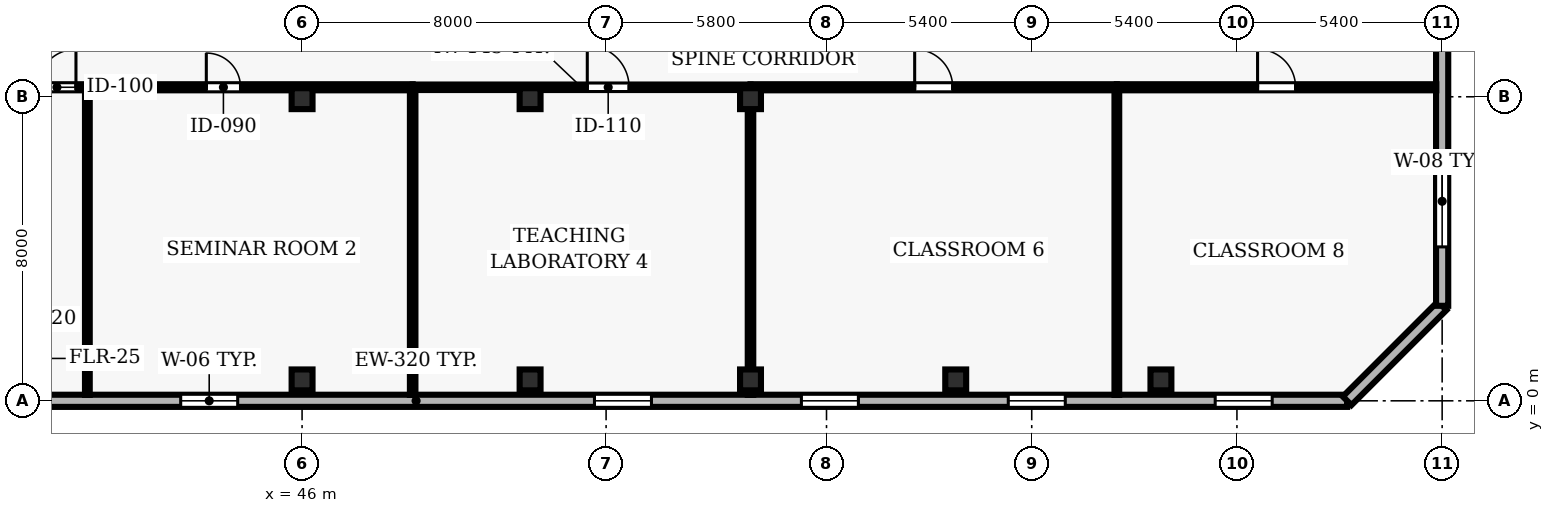
"""IFC4 building model, lengths in metres.
Left out: names, types, materials, properties, quantities, classifications, styles, units other than length and angle.
Written with IfcOpenShell. Run it as: python <this file> out.ifc"""

import sys

from ifc_helpers import new_model, si_unit, direction, frame, frame_2d, origin, origin_2d, place, context, subcontext, project, spatial, rectangle, hollow_rectangle, extrude, element, fill, save


model = new_model("IFC4")
c1 = context("Model", 3, precision=1e-05, world=origin(), true_north=direction((0.0, 1.0)))
c2 = subcontext(c1, "Body", "Model", "MODEL_VIEW")
j1 = project(units=[si_unit("LENGTHUNIT", "METRE"), si_unit("PLANEANGLEUNIT", "RADIAN")], contexts=[c1])
p1 = place(None, origin())
s1 = spatial("IfcSite", under=j1, at=p1, CompositionType="ELEMENT")
p2 = place(p1, origin())
s2 = spatial("IfcBuilding", under=s1, at=p2, CompositionType="ELEMENT")
p3 = place(p2, frame((0.0, 0.0, 26.0)))
s3 = spatial("IfcBuildingStorey", under=s2, at=p3, CompositionType="ELEMENT", Elevation=26.0)
for number, where, z_axis, x_axis in (
    (1, (46.0, 0.55, 0.0), (0.0, 0.0, 1.0), (1.0, 0.0, 0.0)),
    (2, (46.0, 7.95, 0.0), (0.0, 0.0, 1.0), (1.0, 0.0, 0.0)),
    (3, (52.0, 0.55, 0.0), (0.0, 0.0, 1.0), (1.0, 0.0, 0.0)),
    (4, (52.0, 7.95, 0.0), (0.0, 0.0, 1.0), (1.0, 0.0, 0.0)),
    (5, (57.8, 0.55, 0.0), (0.0, 0.0, 1.0), (1.0, 0.0, 0.0)),
    (6, (57.8, 7.95, 0.0), (0.0, 0.0, 1.0), (1.0, 0.0, 0.0)),
    (7, (63.2, 0.55, 0.0), (0.0, 0.0, 1.0), (1.0, 0.0, 0.0)),
    (8, (68.6, 0.55, 0.0), (0.0, 0.0, 1.0), (1.0, 0.0, 0.0)),
):
    element("IfcColumn", number, at=place(p3, frame(where, z_axis=z_axis, x_axis=x_axis)), inside=s3, PredefinedType="COLUMN", context=c2, shape_type="SweptSolid", body=[
        extrude(hollow_rectangle(XDim=0.55, YDim=0.55, WallThickness=0.025, at=origin_2d()), origin(), (0.0, 0.0, 1.0), 5.0),
    ])
p4 = place(p3, frame((24.5, 0.0, 0.0), z_axis=(0.0, 0.0, 1.0), x_axis=(1.0, 0.0, 0.0)))
e9 = element("IfcWall", 9, at=p4, inside=s3, PredefinedType="SOLIDWALL", context=c2, shape_type="SweptSolid", body=[
    extrude(rectangle(XDim=49.0, YDim=0.32, at=frame_2d((24.5, 0.0))), origin(), (0.0, 0.0, 1.0), 4.79),
])
p5 = place(p4, frame((1.972, 0.0, 0.9)))
e10 = element("IfcOpeningElement", 10, at=p5, cuts=e9, PredefinedType="OPENING", context=c2, shape_type="SweptSolid", body=[
    extrude(rectangle(XDim=1.5, YDim=1.8, at=frame_2d((0.75, 0.9))), frame((0.0, 0.17, 0.0), z_axis=(0.0, -1.0, 0.0), x_axis=(1.0, 0.0, 0.0)), (0.0, 0.0, 1.0), 0.34),
])
p6 = place(p4, frame((8.317, 0.0, 0.9)))
e11 = element("IfcOpeningElement", 11, at=p6, cuts=e9, PredefinedType="OPENING", context=c2, shape_type="SweptSolid", body=[
    extrude(rectangle(XDim=1.5, YDim=1.8, at=frame_2d((0.75, 0.9))), frame((0.0, 0.17, 0.0), z_axis=(0.0, -1.0, 0.0), x_axis=(1.0, 0.0, 0.0)), (0.0, 0.0, 1.0), 0.34),
])
p7 = place(p4, frame((18.306, 0.0, 0.9)))
e12 = element("IfcOpeningElement", 12, at=p7, cuts=e9, PredefinedType="OPENING", context=c2, shape_type="SweptSolid", body=[
    extrude(rectangle(XDim=1.5, YDim=1.8, at=frame_2d((0.75, 0.9))), frame((0.0, 0.17, 0.0), z_axis=(0.0, -1.0, 0.0), x_axis=(1.0, 0.0, 0.0)), (0.0, 0.0, 1.0), 0.34),
])
p8 = place(p4, frame((29.194, 0.0, 0.9)))
e13 = element("IfcOpeningElement", 13, at=p8, cuts=e9, PredefinedType="OPENING", context=c2, shape_type="SweptSolid", body=[
    extrude(rectangle(XDim=1.5, YDim=1.8, at=frame_2d((0.75, 0.9))), frame((0.0, 0.17, 0.0), z_axis=(0.0, -1.0, 0.0), x_axis=(1.0, 0.0, 0.0)), (0.0, 0.0, 1.0), 0.34),
])
p9 = place(p4, frame((34.639, 0.0, 0.9)))
e14 = element("IfcOpeningElement", 14, at=p9, cuts=e9, PredefinedType="OPENING", context=c2, shape_type="SweptSolid", body=[
    extrude(rectangle(XDim=1.5, YDim=1.8, at=frame_2d((0.75, 0.9))), frame((0.0, 0.17, 0.0), z_axis=(0.0, -1.0, 0.0), x_axis=(1.0, 0.0, 0.0)), (0.0, 0.0, 1.0), 0.34),
])
p10 = place(p4, frame((40.083, 0.0, 0.9)))
e15 = element("IfcOpeningElement", 15, at=p10, cuts=e9, PredefinedType="OPENING", context=c2, shape_type="SweptSolid", body=[
    extrude(rectangle(XDim=1.5, YDim=1.8, at=frame_2d((0.75, 0.9))), frame((0.0, 0.17, 0.0), z_axis=(0.0, -1.0, 0.0), x_axis=(1.0, 0.0, 0.0)), (0.0, 0.0, 1.0), 0.34),
])
p11 = place(p4, frame((45.528, 0.0, 0.9)))
e16 = element("IfcOpeningElement", 16, at=p11, cuts=e9, PredefinedType="OPENING", context=c2, shape_type="SweptSolid", body=[
    extrude(rectangle(XDim=1.5, YDim=1.8, at=frame_2d((0.75, 0.9))), frame((0.0, 0.17, 0.0), z_axis=(0.0, -1.0, 0.0), x_axis=(1.0, 0.0, 0.0)), (0.0, 0.0, 1.0), 0.34),
])
p12 = place(p3, frame((73.5, 0.0, 0.0), z_axis=(0.0, 0.0, 1.0), x_axis=(0.707106781187, 0.707106781187, 0.0)))
e17 = element("IfcWall", 17, at=p12, inside=s3, PredefinedType="SOLIDWALL", context=c2, shape_type="SweptSolid", body=[
    extrude(rectangle(XDim=3.536, YDim=0.32, at=frame_2d((1.768, 0.0))), origin(), (0.0, 0.0, 1.0), 4.79),
])
p13 = place(p3, frame((76.0, 2.5, 0.0), z_axis=(0.0, 0.0, 1.0), x_axis=(0.0, 1.0, 0.0)))
e18 = element("IfcWall", 18, at=p13, inside=s3, PredefinedType="SOLIDWALL", context=c2, shape_type="SweptSolid", body=[
    extrude(rectangle(XDim=11.0, YDim=0.32, at=frame_2d((5.5, 0.0))), origin(), (0.0, 0.0, 1.0), 4.79),
])
p14 = place(p13, frame((1.55, 0.0, 0.9)))
e19 = element("IfcOpeningElement", 19, at=p14, cuts=e18, PredefinedType="OPENING", context=c2, shape_type="SweptSolid", body=[
    extrude(rectangle(XDim=2.4, YDim=1.8, at=frame_2d((1.2, 0.9))), frame((0.0, 0.17, 0.0), z_axis=(0.0, -1.0, 0.0), x_axis=(1.0, 0.0, 0.0)), (0.0, 0.0, 1.0), 0.34),
])
p15 = place(p3, frame((38.05, 8.25, 0.0), z_axis=(0.0, 0.0, 1.0), x_axis=(1.0, 0.0, 0.0)))
e20 = element("IfcWall", 20, at=p15, inside=s3, PredefinedType="PARTITIONING", context=c2, shape_type="SweptSolid", body=[
    extrude(rectangle(XDim=2.3, YDim=0.16, at=frame_2d((1.15, 0.0))), origin(), (0.0, 0.0, 1.0), 4.155),
])
p16 = place(p15, frame((1.0, 0.0, 0.0)))
e21 = element("IfcOpeningElement", 21, at=p16, cuts=e20, PredefinedType="OPENING", context=c2, shape_type="SweptSolid", body=[
    extrude(rectangle(XDim=1.0, YDim=2.1, at=frame_2d((0.5, 1.05))), frame((0.0, 0.09, 0.0), z_axis=(0.0, -1.0, 0.0), x_axis=(1.0, 0.0, 0.0)), (0.0, 0.0, 1.0), 0.18),
])
p17 = place(p3, frame((40.35, 8.25, 0.0), z_axis=(0.0, 0.0, 1.0), x_axis=(1.0, 0.0, 0.0)))
e22 = element("IfcWall", 22, at=p17, inside=s3, PredefinedType="PARTITIONING", context=c2, shape_type="SweptSolid", body=[
    extrude(rectangle(XDim=8.56, YDim=0.16, at=frame_2d((4.28, 0.0))), origin(), (0.0, 0.0, 1.0), 4.155),
])
p18 = place(p17, frame((3.13, 0.0, 0.0)))
e23 = element("IfcOpeningElement", 23, at=p18, cuts=e22, PredefinedType="OPENING", context=c2, shape_type="SweptSolid", body=[
    extrude(rectangle(XDim=0.9, YDim=2.1, at=frame_2d((0.45, 1.05))), frame((0.0, 0.09, 0.0), z_axis=(0.0, -1.0, 0.0), x_axis=(1.0, 0.0, 0.0)), (0.0, 0.0, 1.0), 0.18),
])
p19 = place(p3, frame((48.91, 8.25, 0.0), z_axis=(0.0, 0.0, 1.0), x_axis=(1.0, 0.0, 0.0)))
e24 = element("IfcWall", 24, at=p19, inside=s3, PredefinedType="PARTITIONING", context=c2, shape_type="SweptSolid", body=[
    extrude(rectangle(XDim=8.89, YDim=0.145, at=frame_2d((4.445, 0.0))), origin(), (0.0, 0.0, 1.0), 4.155),
])
p20 = place(p19, frame((4.595, 0.0, 0.0)))
e25 = element("IfcOpeningElement", 25, at=p20, cuts=e24, PredefinedType="OPENING", context=c2, shape_type="SweptSolid", body=[
    extrude(rectangle(XDim=1.1, YDim=2.15, at=frame_2d((0.55, 1.075))), frame((0.0, 0.083, 0.0), z_axis=(0.0, -1.0, 0.0), x_axis=(1.0, 0.0, 0.0)), (0.0, 0.0, 1.0), 0.165),
])
p21 = place(p3, frame((57.8, 8.25, 0.0), z_axis=(0.0, 0.0, 1.0), x_axis=(1.0, 0.0, 0.0)))
e26 = element("IfcWall", 26, at=p21, inside=s3, PredefinedType="PARTITIONING", context=c2, shape_type="SweptSolid", body=[
    extrude(rectangle(XDim=9.64, YDim=0.16, at=frame_2d((4.82, 0.0))), origin(), (0.0, 0.0, 1.0), 4.79),
])
p22 = place(p21, frame((4.32, 0.0, 0.0)))
e27 = element("IfcOpeningElement", 27, at=p22, cuts=e26, PredefinedType="OPENING", context=c2, shape_type="SweptSolid", body=[
    extrude(rectangle(XDim=1.0, YDim=2.1, at=frame_2d((0.5, 1.05))), frame((0.0, 0.09, 0.0), z_axis=(0.0, -1.0, 0.0), x_axis=(1.0, 0.0, 0.0)), (0.0, 0.0, 1.0), 0.18),
])
p23 = place(p3, frame((67.44, 8.25, 0.0), z_axis=(0.0, 0.0, 1.0), x_axis=(1.0, 0.0, 0.0)))
e28 = element("IfcWall", 28, at=p23, inside=s3, PredefinedType="PARTITIONING", context=c2, shape_type="SweptSolid", body=[
    extrude(rectangle(XDim=8.405, YDim=0.16, at=frame_2d((4.203, 0.0))), origin(), (0.0, 0.0, 1.0), 4.79),
])
p24 = place(p23, frame((3.703, 0.0, 0.0)))
e29 = element("IfcOpeningElement", 29, at=p24, cuts=e28, PredefinedType="OPENING", context=c2, shape_type="SweptSolid", body=[
    extrude(rectangle(XDim=1.0, YDim=2.1, at=frame_2d((0.5, 1.05))), frame((0.0, 0.09, 0.0), z_axis=(0.0, -1.0, 0.0), x_axis=(1.0, 0.0, 0.0)), (0.0, 0.0, 1.0), 0.18),
])
p25 = place(p3, frame((40.35, 0.155, 0.0), z_axis=(0.0, 0.0, 1.0), x_axis=(0.0, 1.0, 0.0)))
e30 = element("IfcWall", 30, at=p25, inside=s3, PredefinedType="PARTITIONING", context=c2, shape_type="SweptSolid", body=[
    extrude(rectangle(XDim=8.02, YDim=0.125, at=frame_2d((4.01, 0.0))), origin(), (0.0, 0.0, 1.0), 4.79),
])
p26 = place(p3, frame((48.91, 0.155, 0.0), z_axis=(0.0, 0.0, 1.0), x_axis=(0.0, 1.0, 0.0)))
e31 = element("IfcWall", 31, at=p26, inside=s3, PredefinedType="PARTITIONING", context=c2, shape_type="SweptSolid", body=[
    extrude(rectangle(XDim=8.02, YDim=0.145, at=frame_2d((4.01, 0.0))), origin(), (0.0, 0.0, 1.0), 4.79),
])
p27 = place(p3, frame((57.8, 0.155, 0.0), z_axis=(0.0, 0.0, 1.0), x_axis=(0.0, 1.0, 0.0)))
e32 = element("IfcWall", 32, at=p27, inside=s3, PredefinedType="PARTITIONING", context=c2, shape_type="SweptSolid", body=[
    extrude(rectangle(XDim=8.02, YDim=0.145, at=frame_2d((4.01, 0.0))), origin(), (0.0, 0.0, 1.0), 4.155),
])
p28 = place(p3, frame((67.44, 0.155, 0.0), z_axis=(0.0, 0.0, 1.0), x_axis=(0.0, 1.0, 0.0)))
e33 = element("IfcWall", 33, at=p28, inside=s3, PredefinedType="PARTITIONING", context=c2, shape_type="SweptSolid", body=[
    extrude(rectangle(XDim=8.02, YDim=0.125, at=frame_2d((4.01, 0.0))), origin(), (0.0, 0.0, 1.0), 4.79),
])
p29 = place(p7, origin())
e34 = element("IfcWindow", 34, at=p29, inside=s3, PartitioningType="SINGLE_PANEL", PredefinedType="WINDOW", context=c2, shape_type="SweptSolid", body=[
    extrude(rectangle(XDim=1.5, YDim=1.8, at=frame_2d((0.75, 0.9))), frame((0.0, 0.03, 0.0), z_axis=(0.0, -1.0, 0.0), x_axis=(1.0, 0.0, 0.0)), (0.0, 0.0, 1.0), 0.06),
])
fill(e12, e34)
p30 = place(p8, origin())
e35 = element("IfcWindow", 35, at=p30, inside=s3, PartitioningType="SINGLE_PANEL", PredefinedType="WINDOW", context=c2, shape_type="SweptSolid", body=[
    extrude(rectangle(XDim=1.5, YDim=1.8, at=frame_2d((0.75, 0.9))), frame((0.0, 0.03, 0.0), z_axis=(0.0, -1.0, 0.0), x_axis=(1.0, 0.0, 0.0)), (0.0, 0.0, 1.0), 0.06),
])
fill(e13, e35)
p31 = place(p9, origin())
e36 = element("IfcWindow", 36, at=p31, inside=s3, PartitioningType="SINGLE_PANEL", PredefinedType="WINDOW", context=c2, shape_type="SweptSolid", body=[
    extrude(rectangle(XDim=1.5, YDim=1.8, at=frame_2d((0.75, 0.9))), frame((0.0, 0.03, 0.0), z_axis=(0.0, -1.0, 0.0), x_axis=(1.0, 0.0, 0.0)), (0.0, 0.0, 1.0), 0.06),
])
fill(e14, e36)
p32 = place(p10, origin())
e37 = element("IfcWindow", 37, at=p32, inside=s3, PartitioningType="SINGLE_PANEL", PredefinedType="WINDOW", context=c2, shape_type="SweptSolid", body=[
    extrude(rectangle(XDim=1.5, YDim=1.8, at=frame_2d((0.75, 0.9))), frame((0.0, 0.03, 0.0), z_axis=(0.0, -1.0, 0.0), x_axis=(1.0, 0.0, 0.0)), (0.0, 0.0, 1.0), 0.06),
])
fill(e15, e37)
p33 = place(p11, origin())
e38 = element("IfcWindow", 38, at=p33, inside=s3, PartitioningType="SINGLE_PANEL", PredefinedType="WINDOW", context=c2, shape_type="SweptSolid", body=[
    extrude(rectangle(XDim=1.5, YDim=1.8, at=frame_2d((0.75, 0.9))), frame((0.0, 0.03, 0.0), z_axis=(0.0, -1.0, 0.0), x_axis=(1.0, 0.0, 0.0)), (0.0, 0.0, 1.0), 0.06),
])
fill(e16, e38)
p34 = place(p14, origin())
e39 = element("IfcWindow", 39, at=p34, inside=s3, PartitioningType="SINGLE_PANEL", PredefinedType="WINDOW", context=c2, shape_type="SweptSolid", body=[
    extrude(rectangle(XDim=2.4, YDim=1.8, at=frame_2d((1.2, 0.9))), frame((0.0, 0.03, 0.0), z_axis=(0.0, -1.0, 0.0), x_axis=(1.0, 0.0, 0.0)), (0.0, 0.0, 1.0), 0.06),
])
fill(e19, e39)
p35 = place(p16, origin())
e40 = element("IfcDoor", 40, at=p35, inside=s3, OperationType="SINGLE_SWING_RIGHT", PredefinedType="DOOR", context=c2, shape_type="SweptSolid", body=[
    extrude(rectangle(XDim=1.0, YDim=2.1, at=frame_2d((0.5, 1.05))), frame((0.0, 0.025, 0.0), z_axis=(0.0, -1.0, 0.0), x_axis=(1.0, 0.0, 0.0)), (0.0, 0.0, 1.0), 0.05),
])
fill(e21, e40)
p36 = place(p18, origin())
e41 = element("IfcDoor", 41, at=p36, inside=s3, OperationType="SINGLE_SWING_LEFT", PredefinedType="DOOR", context=c2, shape_type="SweptSolid", body=[
    extrude(rectangle(XDim=0.9, YDim=2.1, at=frame_2d((0.45, 1.05))), frame((0.0, 0.025, 0.0), z_axis=(0.0, -1.0, 0.0), x_axis=(1.0, 0.0, 0.0)), (0.0, 0.0, 1.0), 0.05),
])
fill(e23, e41)
p37 = place(p20, origin())
e42 = element("IfcDoor", 42, at=p37, inside=s3, OperationType="SINGLE_SWING_LEFT", PredefinedType="DOOR", context=c2, shape_type="SweptSolid", body=[
    extrude(rectangle(XDim=1.1, YDim=2.15, at=frame_2d((0.55, 1.075))), frame((0.0, 0.025, 0.0), z_axis=(0.0, -1.0, 0.0), x_axis=(1.0, 0.0, 0.0)), (0.0, 0.0, 1.0), 0.05),
])
fill(e25, e42)
p38 = place(p22, origin())
e43 = element("IfcDoor", 43, at=p38, inside=s3, OperationType="SINGLE_SWING_LEFT", PredefinedType="DOOR", context=c2, shape_type="SweptSolid", body=[
    extrude(rectangle(XDim=1.0, YDim=2.1, at=frame_2d((0.5, 1.05))), frame((0.0, 0.025, 0.0), z_axis=(0.0, -1.0, 0.0), x_axis=(1.0, 0.0, 0.0)), (0.0, 0.0, 1.0), 0.05),
])
fill(e27, e43)
p39 = place(p24, origin())
e44 = element("IfcDoor", 44, at=p39, inside=s3, OperationType="SINGLE_SWING_LEFT", PredefinedType="DOOR", context=c2, shape_type="SweptSolid", body=[
    extrude(rectangle(XDim=1.0, YDim=2.1, at=frame_2d((0.5, 1.05))), frame((0.0, 0.025, 0.0), z_axis=(0.0, -1.0, 0.0), x_axis=(1.0, 0.0, 0.0)), (0.0, 0.0, 1.0), 0.05),
])
fill(e29, e44)
save(model, sys.argv[1])
